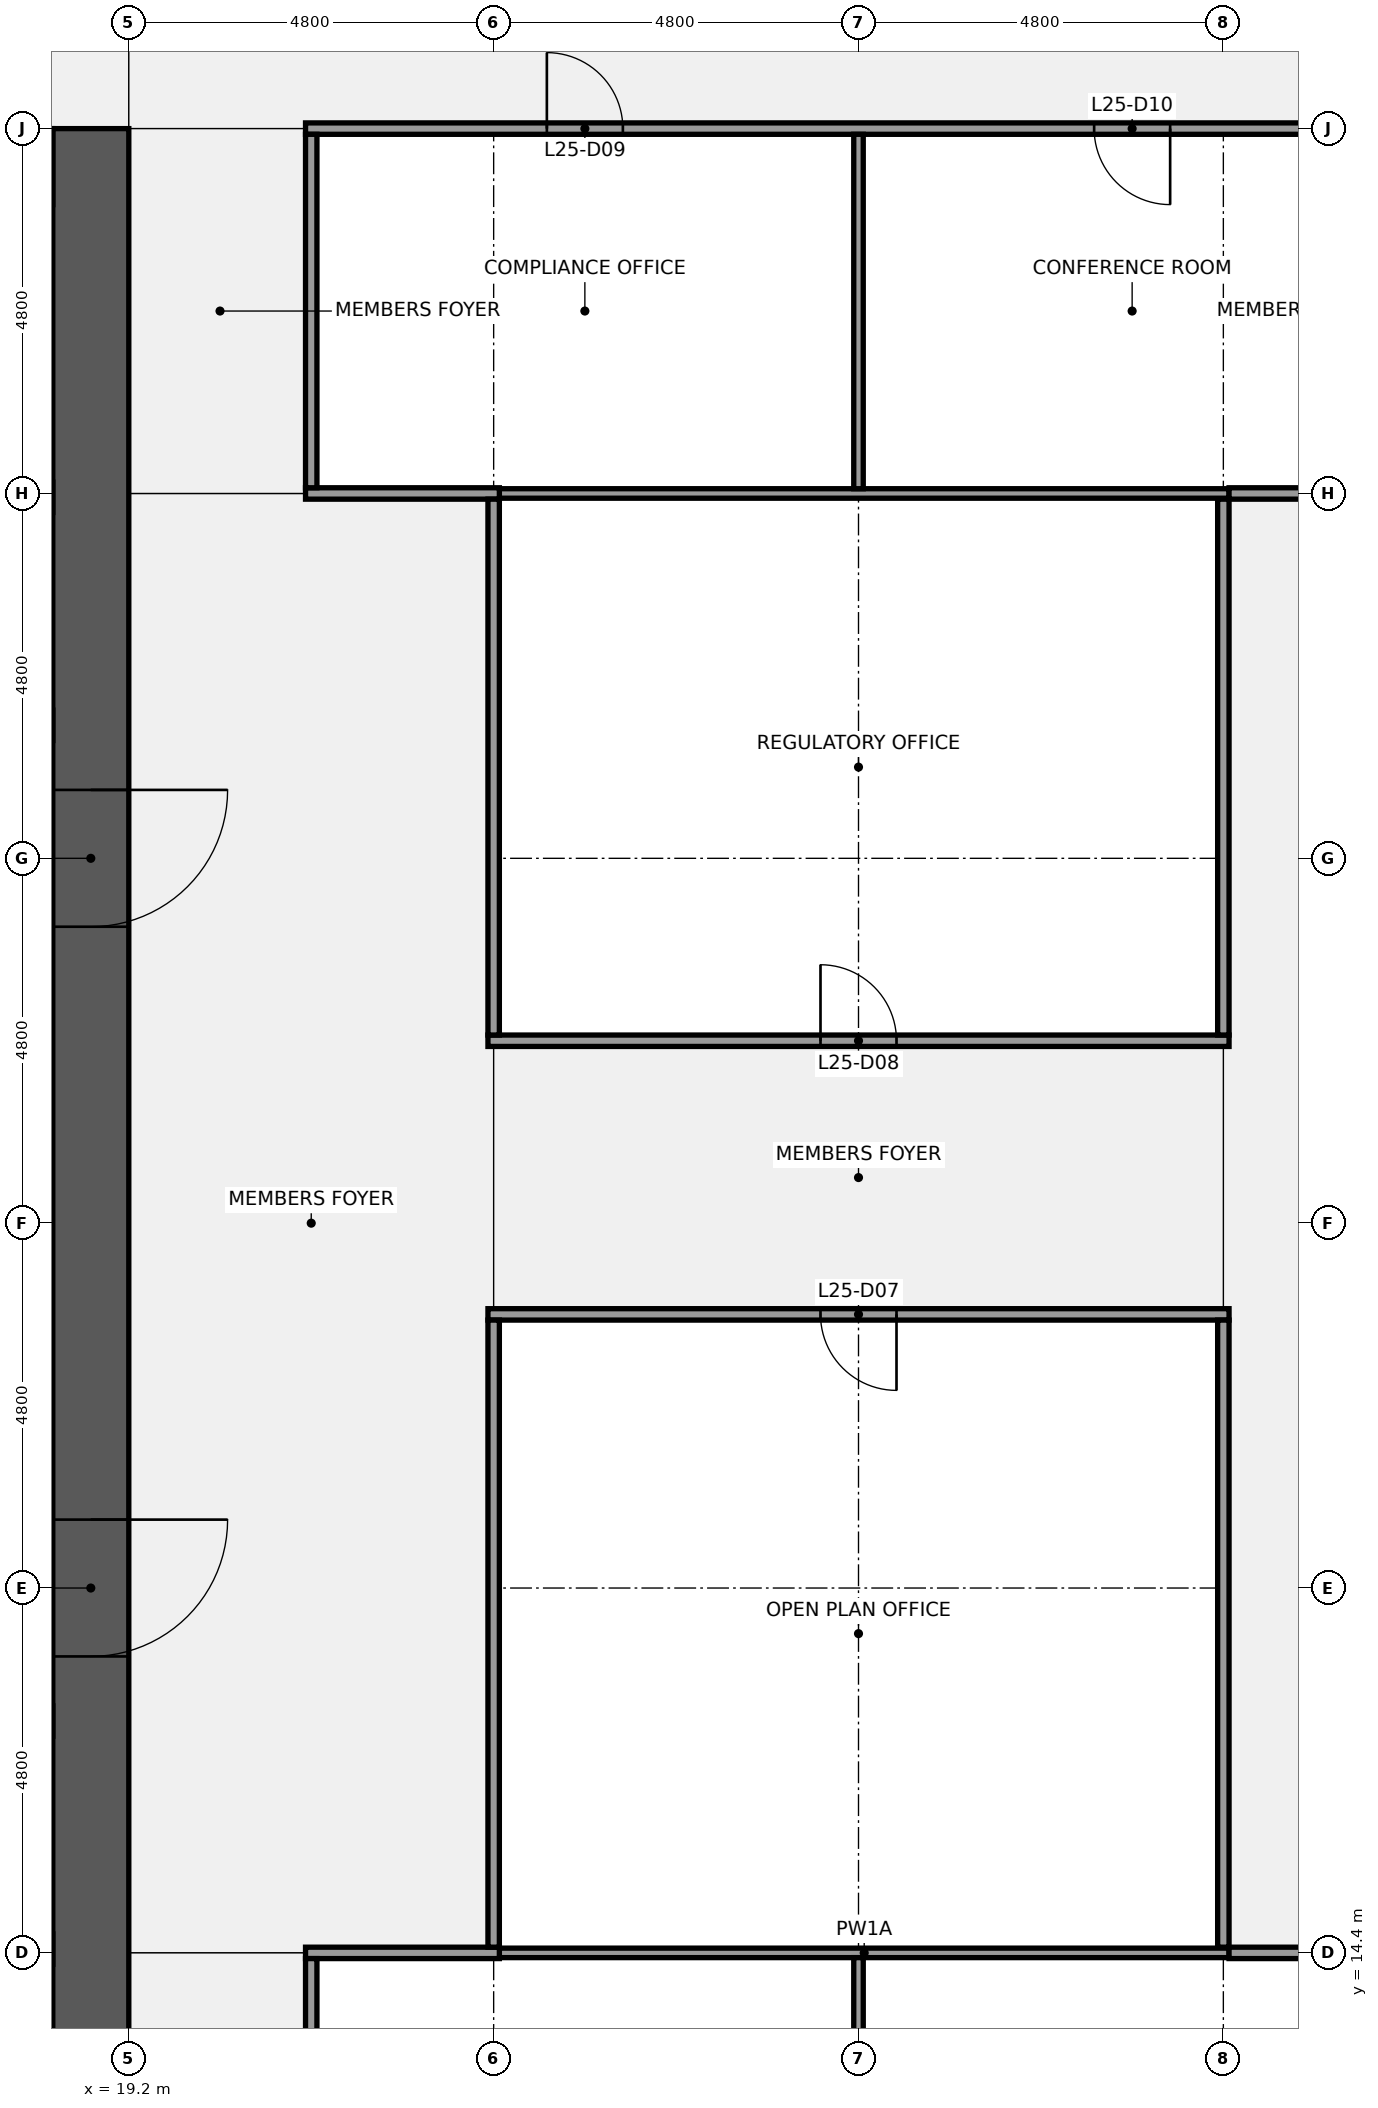
"""IFC4 building model, lengths in metres.
Left out: names, types, materials, properties, quantities, classifications, styles, units other than length and angle.
Written with IfcOpenShell. Run it as: python <this file> out.ifc"""

import sys

from ifc_helpers import new_model, si_unit, direction, frame, frame_2d, origin, place, context, subcontext, project, spatial, rectangle, extrude, element, fill, save


model = new_model("IFC4")
c1 = context("Model", 3, precision=1e-05, world=origin(), true_north=direction((0.0, 1.0)))
c2 = subcontext(c1, "Body", "Model", "MODEL_VIEW")
j1 = project(units=[si_unit("LENGTHUNIT", "METRE"), si_unit("PLANEANGLEUNIT", "RADIAN")], contexts=[c1])
p1 = place(None, origin())
s1 = spatial("IfcSite", under=j1, at=p1, CompositionType="ELEMENT")
p2 = place(p1, origin())
s2 = spatial("IfcBuilding", under=s1, at=p2, CompositionType="ELEMENT")
p3 = place(p2, frame((0.0, 0.0, 120.1)))
s3 = spatial("IfcBuildingStorey", under=s2, at=p3, CompositionType="ELEMENT", Elevation=120.1)
p4 = place(p3, frame((18.7, 38.4, 0.0), z_axis=(0.0, 0.0, 1.0), x_axis=(0.0, -1.0, 0.0)))
e1 = element("IfcWall", 1, at=p4, inside=s3, PredefinedType="SHEAR", context=c2, shape_type="SweptSolid", body=[
    extrude(rectangle(XDim=28.8, YDim=1.0, at=frame_2d((14.4, 0.0))), origin(), (0.0, 0.0, 1.0), 3.84),
])
p5 = place(p4, frame((18.3, 0.0, 0.0)))
e2 = element("IfcOpeningElement", 2, at=p5, cuts=e1, PredefinedType="OPENING", context=c2, shape_type="SweptSolid", body=[
    extrude(rectangle(XDim=1.8, YDim=2.1, at=frame_2d((0.9, 1.05))), frame((0.0, 0.51, 0.0), z_axis=(0.0, -1.0, 0.0), x_axis=(1.0, 0.0, 0.0)), (0.0, 0.0, 1.0), 1.02),
])
p6 = place(p4, frame((8.7, 0.0, 0.0)))
e3 = element("IfcOpeningElement", 3, at=p6, cuts=e1, PredefinedType="OPENING", context=c2, shape_type="SweptSolid", body=[
    extrude(rectangle(XDim=1.8, YDim=2.1, at=frame_2d((0.9, 1.05))), frame((0.0, 0.51, 0.0), z_axis=(0.0, -1.0, 0.0), x_axis=(1.0, 0.0, 0.0)), (0.0, 0.0, 1.0), 1.02),
])
p7 = place(p3, frame((1.0, 14.45, 0.0), z_axis=(0.0, 0.0, 1.0), x_axis=(1.0, 0.0, 0.0)))
e4 = element("IfcWall", 4, at=p7, inside=s3, PredefinedType="SHEAR", context=c2, shape_type="SweptSolid", body=[
    extrude(rectangle(XDim=17.2, YDim=0.4, at=frame_2d((8.6, 0.0))), origin(), (0.0, 0.0, 1.0), 3.84),
])
p8 = place(p3, frame((1.0, 17.45, 0.0), z_axis=(0.0, 0.0, 1.0), x_axis=(1.0, 0.0, 0.0)))
e5 = element("IfcWall", 5, at=p8, inside=s3, PredefinedType="SHEAR", context=c2, shape_type="SweptSolid", body=[
    extrude(rectangle(XDim=17.2, YDim=0.4, at=frame_2d((8.6, 0.0))), origin(), (0.0, 0.0, 1.0), 3.84),
])
p9 = place(p8, frame((0.762, 0.0, 0.0)))
e6 = element("IfcOpeningElement", 6, at=p9, cuts=e5, PredefinedType="OPENING", context=c2, shape_type="SweptSolid", body=[
    extrude(rectangle(XDim=1.0, YDim=2.1, at=frame_2d((0.5, 1.05))), frame((0.0, 0.21, 0.0), z_axis=(0.0, -1.0, 0.0), x_axis=(1.0, 0.0, 0.0)), (0.0, 0.0, 1.0), 0.42),
])
p10 = place(p8, frame((4.5, 0.0, 0.0)))
e7 = element("IfcOpeningElement", 7, at=p10, cuts=e5, PredefinedType="OPENING", context=c2, shape_type="SweptSolid", body=[
    extrude(rectangle(XDim=1.0, YDim=2.1, at=frame_2d((0.5, 1.05))), frame((0.0, 0.21, 0.0), z_axis=(0.0, -1.0, 0.0), x_axis=(1.0, 0.0, 0.0)), (0.0, 0.0, 1.0), 0.42),
])
p11 = place(p8, frame((8.4, 0.0, 0.0)))
e8 = element("IfcOpeningElement", 8, at=p11, cuts=e5, PredefinedType="OPENING", context=c2, shape_type="SweptSolid", body=[
    extrude(rectangle(XDim=1.0, YDim=2.1, at=frame_2d((0.5, 1.05))), frame((0.0, 0.21, 0.0), z_axis=(0.0, -1.0, 0.0), x_axis=(1.0, 0.0, 0.0)), (0.0, 0.0, 1.0), 0.42),
])
p12 = place(p8, frame((11.4, 0.0, 0.0)))
e9 = element("IfcOpeningElement", 9, at=p12, cuts=e5, PredefinedType="OPENING", context=c2, shape_type="SweptSolid", body=[
    extrude(rectangle(XDim=1.0, YDim=2.1, at=frame_2d((0.5, 1.05))), frame((0.0, 0.21, 0.0), z_axis=(0.0, -1.0, 0.0), x_axis=(1.0, 0.0, 0.0)), (0.0, 0.0, 1.0), 0.42),
])
p13 = place(p8, frame((14.837, 0.0, 0.0)))
e10 = element("IfcOpeningElement", 10, at=p13, cuts=e5, PredefinedType="OPENING", context=c2, shape_type="SweptSolid", body=[
    extrude(rectangle(XDim=1.0, YDim=2.1, at=frame_2d((0.5, 1.05))), frame((0.0, 0.21, 0.0), z_axis=(0.0, -1.0, 0.0), x_axis=(1.0, 0.0, 0.0)), (0.0, 0.0, 1.0), 0.42),
])
p14 = place(p3, frame((1.0, 30.55, 0.0), z_axis=(0.0, 0.0, 1.0), x_axis=(1.0, 0.0, 0.0)))
e11 = element("IfcWall", 11, at=p14, inside=s3, PredefinedType="SHEAR", context=c2, shape_type="SweptSolid", body=[
    extrude(rectangle(XDim=17.2, YDim=0.4, at=frame_2d((8.6, 0.0))), origin(), (0.0, 0.0, 1.0), 3.84),
])
p15 = place(p14, frame((1.663, 0.0, 0.0)))
e12 = element("IfcOpeningElement", 12, at=p15, cuts=e11, PredefinedType="OPENING", context=c2, shape_type="SweptSolid", body=[
    extrude(rectangle(XDim=1.0, YDim=2.1, at=frame_2d((0.5, 1.05))), frame((0.0, 0.21, 0.0), z_axis=(0.0, -1.0, 0.0), x_axis=(1.0, 0.0, 0.0)), (0.0, 0.0, 1.0), 0.42),
])
p16 = place(p14, frame((5.7, 0.0, 0.0)))
e13 = element("IfcOpeningElement", 13, at=p16, cuts=e11, PredefinedType="OPENING", context=c2, shape_type="SweptSolid", body=[
    extrude(rectangle(XDim=1.0, YDim=2.1, at=frame_2d((0.5, 1.05))), frame((0.0, 0.21, 0.0), z_axis=(0.0, -1.0, 0.0), x_axis=(1.0, 0.0, 0.0)), (0.0, 0.0, 1.0), 0.42),
])
p17 = place(p14, frame((9.0, 0.0, 0.0)))
e14 = element("IfcOpeningElement", 14, at=p17, cuts=e11, PredefinedType="OPENING", context=c2, shape_type="SweptSolid", body=[
    extrude(rectangle(XDim=1.0, YDim=2.1, at=frame_2d((0.5, 1.05))), frame((0.0, 0.21, 0.0), z_axis=(0.0, -1.0, 0.0), x_axis=(1.0, 0.0, 0.0)), (0.0, 0.0, 1.0), 0.42),
])
p18 = place(p14, frame((11.7, 0.0, 0.0)))
e15 = element("IfcOpeningElement", 15, at=p18, cuts=e11, PredefinedType="OPENING", context=c2, shape_type="SweptSolid", body=[
    extrude(rectangle(XDim=1.0, YDim=2.1, at=frame_2d((0.5, 1.05))), frame((0.0, 0.21, 0.0), z_axis=(0.0, -1.0, 0.0), x_axis=(1.0, 0.0, 0.0)), (0.0, 0.0, 1.0), 0.42),
])
p19 = place(p14, frame((14.837, 0.0, 0.0)))
e16 = element("IfcOpeningElement", 16, at=p19, cuts=e11, PredefinedType="OPENING", context=c2, shape_type="SweptSolid", body=[
    extrude(rectangle(XDim=1.0, YDim=2.1, at=frame_2d((0.5, 1.05))), frame((0.0, 0.21, 0.0), z_axis=(0.0, -1.0, 0.0), x_axis=(1.0, 0.0, 0.0)), (0.0, 0.0, 1.0), 0.42),
])
p20 = place(p3, frame((1.0, 33.55, 0.0), z_axis=(0.0, 0.0, 1.0), x_axis=(1.0, 0.0, 0.0)))
e17 = element("IfcWall", 17, at=p20, inside=s3, PredefinedType="SHEAR", context=c2, shape_type="SweptSolid", body=[
    extrude(rectangle(XDim=17.2, YDim=0.4, at=frame_2d((8.6, 0.0))), origin(), (0.0, 0.0, 1.0), 3.84),
])
p21 = place(p3, frame((24.075, 14.4, 0.0), z_axis=(0.0, 0.0, 1.0), x_axis=(1.0, 0.0, 0.0)))
e18 = element("IfcWall", 18, at=p21, inside=s3, PredefinedType="PARTITIONING", context=c2, shape_type="SweptSolid", body=[
    extrude(rectangle(XDim=9.6, YDim=0.125, at=frame_2d((4.8, 0.0))), origin(), (0.0, 0.0, 1.0), 2.936),
])
p22 = place(p3, frame((21.525, 14.4, 0.0), z_axis=(0.0, 0.0, 1.0), x_axis=(1.0, 0.0, 0.0)))
e19 = element("IfcWall", 19, at=p22, inside=s3, PredefinedType="PARTITIONING", context=c2, shape_type="SweptSolid", body=[
    extrude(rectangle(XDim=2.55, YDim=0.15, at=frame_2d((1.275, 0.0))), origin(), (0.0, 0.0, 1.0), 2.936),
])
p23 = place(p3, frame((33.675, 14.4, 0.0), z_axis=(0.0, 0.0, 1.0), x_axis=(1.0, 0.0, 0.0)))
e20 = element("IfcWall", 20, at=p23, inside=s3, PredefinedType="PARTITIONING", context=c2, shape_type="SweptSolid", body=[
    extrude(rectangle(XDim=2.4, YDim=0.15, at=frame_2d((1.2, 0.0))), origin(), (0.0, 0.0, 1.0), 2.936),
])
p24 = place(p3, frame((23.925, 22.8, 0.0), z_axis=(0.0, 0.0, 1.0), x_axis=(1.0, 0.0, 0.0)))
e21 = element("IfcWall", 21, at=p24, inside=s3, PredefinedType="PARTITIONING", context=c2, shape_type="SweptSolid", body=[
    extrude(rectangle(XDim=9.75, YDim=0.15, at=frame_2d((4.875, 0.0))), origin(), (0.0, 0.0, 1.0), 2.936),
])
p25 = place(p24, frame((4.375, 0.0, 0.0)))
e22 = element("IfcOpeningElement", 22, at=p25, cuts=e21, PredefinedType="OPENING", context=c2, shape_type="SweptSolid", body=[
    extrude(rectangle(XDim=1.0, YDim=2.1, at=frame_2d((0.5, 1.05))), frame((0.0, 0.085, 0.0), z_axis=(0.0, -1.0, 0.0), x_axis=(1.0, 0.0, 0.0)), (0.0, 0.0, 1.0), 0.17),
])
p26 = place(p3, frame((23.925, 26.4, 0.0), z_axis=(0.0, 0.0, 1.0), x_axis=(1.0, 0.0, 0.0)))
e23 = element("IfcWall", 23, at=p26, inside=s3, PredefinedType="PARTITIONING", context=c2, shape_type="SweptSolid", body=[
    extrude(rectangle(XDim=9.75, YDim=0.15, at=frame_2d((4.875, 0.0))), origin(), (0.0, 0.0, 1.0), 2.936),
])
p27 = place(p26, frame((4.375, 0.0, 0.0)))
e24 = element("IfcOpeningElement", 24, at=p27, cuts=e23, PredefinedType="OPENING", context=c2, shape_type="SweptSolid", body=[
    extrude(rectangle(XDim=1.0, YDim=2.1, at=frame_2d((0.5, 1.05))), frame((0.0, 0.085, 0.0), z_axis=(0.0, -1.0, 0.0), x_axis=(1.0, 0.0, 0.0)), (0.0, 0.0, 1.0), 0.17),
])
p28 = place(p3, frame((24.075, 33.6, 0.0), z_axis=(0.0, 0.0, 1.0), x_axis=(1.0, 0.0, 0.0)))
e25 = element("IfcWall", 25, at=p28, inside=s3, PredefinedType="PARTITIONING", context=c2, shape_type="SweptSolid", body=[
    extrude(rectangle(XDim=9.6, YDim=0.125, at=frame_2d((4.8, 0.0))), origin(), (0.0, 0.0, 1.0), 2.936),
])
p29 = place(p3, frame((21.525, 33.6, 0.0), z_axis=(0.0, 0.0, 1.0), x_axis=(1.0, 0.0, 0.0)))
e26 = element("IfcWall", 26, at=p29, inside=s3, PredefinedType="PARTITIONING", context=c2, shape_type="SweptSolid", body=[
    extrude(rectangle(XDim=2.55, YDim=0.15, at=frame_2d((1.275, 0.0))), origin(), (0.0, 0.0, 1.0), 2.936),
])
p30 = place(p3, frame((33.675, 33.6, 0.0), z_axis=(0.0, 0.0, 1.0), x_axis=(1.0, 0.0, 0.0)))
e27 = element("IfcWall", 27, at=p30, inside=s3, PredefinedType="PARTITIONING", context=c2, shape_type="SweptSolid", body=[
    extrude(rectangle(XDim=2.4, YDim=0.15, at=frame_2d((1.2, 0.0))), origin(), (0.0, 0.0, 1.0), 2.936),
])
p31 = place(p3, frame((21.525, 38.4, 0.0), z_axis=(0.0, 0.0, 1.0), x_axis=(1.0, 0.0, 0.0)))
e28 = element("IfcWall", 28, at=p31, inside=s3, PredefinedType="PARTITIONING", context=c2, shape_type="SweptSolid", body=[
    extrude(rectangle(XDim=14.55, YDim=0.15, at=frame_2d((7.275, 0.0))), origin(), (0.0, 0.0, 1.0), 2.936),
])
p32 = place(p31, frame((3.175, 0.0, 0.0)))
e29 = element("IfcOpeningElement", 29, at=p32, cuts=e28, PredefinedType="OPENING", context=c2, shape_type="SweptSolid", body=[
    extrude(rectangle(XDim=1.0, YDim=2.1, at=frame_2d((0.5, 1.05))), frame((0.0, 0.085, 0.0), z_axis=(0.0, -1.0, 0.0), x_axis=(1.0, 0.0, 0.0)), (0.0, 0.0, 1.0), 0.17),
])
p33 = place(p31, frame((10.375, 0.0, 0.0)))
e30 = element("IfcOpeningElement", 30, at=p33, cuts=e28, PredefinedType="OPENING", context=c2, shape_type="SweptSolid", body=[
    extrude(rectangle(XDim=1.0, YDim=2.1, at=frame_2d((0.5, 1.05))), frame((0.0, 0.085, 0.0), z_axis=(0.0, -1.0, 0.0), x_axis=(1.0, 0.0, 0.0)), (0.0, 0.0, 1.0), 0.17),
])
for number, where, z_axis, x_axis in (
    (31, (21.6, 9.675, 0.0), (0.0, 0.0, 1.0), (0.0, 1.0, 0.0)),
    (32, (21.6, 33.675, 0.0), (0.0, 0.0, 1.0), (0.0, 1.0, 0.0)),
):
    element("IfcWall", number, at=place(p3, frame(where, z_axis=z_axis, x_axis=x_axis)), inside=s3, PredefinedType="PARTITIONING", context=c2, shape_type="SweptSolid", body=[
        extrude(rectangle(XDim=4.65, YDim=0.15, at=frame_2d((2.325, 0.0))), origin(), (0.0, 0.0, 1.0), 2.936),
    ])
p34 = place(p3, frame((24.0, 14.475, 0.0), z_axis=(0.0, 0.0, 1.0), x_axis=(0.0, 1.0, 0.0)))
e33 = element("IfcWall", 33, at=p34, inside=s3, PredefinedType="PARTITIONING", context=c2, shape_type="SweptSolid", body=[
    extrude(rectangle(XDim=8.25, YDim=0.15, at=frame_2d((4.125, 0.0))), origin(), (0.0, 0.0, 1.0), 2.936),
])
p35 = place(p3, frame((24.0, 26.475, 0.0), z_axis=(0.0, 0.0, 1.0), x_axis=(0.0, 1.0, 0.0)))
e34 = element("IfcWall", 34, at=p35, inside=s3, PredefinedType="PARTITIONING", context=c2, shape_type="SweptSolid", body=[
    extrude(rectangle(XDim=7.05, YDim=0.15, at=frame_2d((3.525, 0.0))), origin(), (0.0, 0.0, 1.0), 2.936),
])
for number, where, z_axis, x_axis in (
    (35, (28.8, 9.675, 0.0), (0.0, 0.0, 1.0), (0.0, 1.0, 0.0)),
    (36, (28.8, 33.663, 0.0), (0.0, 0.0, 1.0), (0.0, 1.0, 0.0)),
):
    element("IfcWall", number, at=place(p3, frame(where, z_axis=z_axis, x_axis=x_axis)), inside=s3, PredefinedType="PARTITIONING", context=c2, shape_type="SweptSolid", body=[
        extrude(rectangle(XDim=4.662, YDim=0.125, at=frame_2d((2.331, 0.0))), origin(), (0.0, 0.0, 1.0), 2.936),
    ])
p36 = place(p3, frame((33.6, 14.475, 0.0), z_axis=(0.0, 0.0, 1.0), x_axis=(0.0, 1.0, 0.0)))
e37 = element("IfcWall", 37, at=p36, inside=s3, PredefinedType="PARTITIONING", context=c2, shape_type="SweptSolid", body=[
    extrude(rectangle(XDim=8.25, YDim=0.15, at=frame_2d((4.125, 0.0))), origin(), (0.0, 0.0, 1.0), 2.936),
])
p37 = place(p3, frame((33.6, 26.475, 0.0), z_axis=(0.0, 0.0, 1.0), x_axis=(0.0, 1.0, 0.0)))
e38 = element("IfcWall", 38, at=p37, inside=s3, PredefinedType="PARTITIONING", context=c2, shape_type="SweptSolid", body=[
    extrude(rectangle(XDim=7.05, YDim=0.15, at=frame_2d((3.525, 0.0))), origin(), (0.0, 0.0, 1.0), 2.936),
])
p38 = place(p5, origin())
e39 = element("IfcDoor", 39, at=p38, inside=s3, OperationType="DOUBLE_DOOR_SINGLE_SWING", PredefinedType="DOOR", context=c2, shape_type="SweptSolid", body=[
    extrude(rectangle(XDim=1.8, YDim=2.1, at=frame_2d((0.9, 1.05))), frame((0.0, 0.025, 0.0), z_axis=(0.0, -1.0, 0.0), x_axis=(1.0, 0.0, 0.0)), (0.0, 0.0, 1.0), 0.05),
])
fill(e2, e39)
p39 = place(p6, origin())
e40 = element("IfcDoor", 40, at=p39, inside=s3, OperationType="DOUBLE_DOOR_SINGLE_SWING", PredefinedType="DOOR", context=c2, shape_type="SweptSolid", body=[
    extrude(rectangle(XDim=1.8, YDim=2.1, at=frame_2d((0.9, 1.05))), frame((0.0, 0.025, 0.0), z_axis=(0.0, -1.0, 0.0), x_axis=(1.0, 0.0, 0.0)), (0.0, 0.0, 1.0), 0.05),
])
fill(e3, e40)
p40 = place(p25, origin())
e41 = element("IfcDoor", 41, at=p40, inside=s3, OperationType="SINGLE_SWING_RIGHT", PredefinedType="DOOR", context=c2, shape_type="SweptSolid", body=[
    extrude(rectangle(XDim=1.0, YDim=2.1, at=frame_2d((0.5, 1.05))), frame((0.0, 0.025, 0.0), z_axis=(0.0, -1.0, 0.0), x_axis=(1.0, 0.0, 0.0)), (0.0, 0.0, 1.0), 0.05),
])
fill(e22, e41)
p41 = place(p27, origin())
e42 = element("IfcDoor", 42, at=p41, inside=s3, OperationType="SINGLE_SWING_LEFT", PredefinedType="DOOR", context=c2, shape_type="SweptSolid", body=[
    extrude(rectangle(XDim=1.0, YDim=2.1, at=frame_2d((0.5, 1.05))), frame((0.0, 0.025, 0.0), z_axis=(0.0, -1.0, 0.0), x_axis=(1.0, 0.0, 0.0)), (0.0, 0.0, 1.0), 0.05),
])
fill(e24, e42)
p42 = place(p32, origin())
e43 = element("IfcDoor", 43, at=p42, inside=s3, OperationType="SINGLE_SWING_LEFT", PredefinedType="DOOR", context=c2, shape_type="SweptSolid", body=[
    extrude(rectangle(XDim=1.0, YDim=2.1, at=frame_2d((0.5, 1.05))), frame((0.0, 0.025, 0.0), z_axis=(0.0, -1.0, 0.0), x_axis=(1.0, 0.0, 0.0)), (0.0, 0.0, 1.0), 0.05),
])
fill(e29, e43)
p43 = place(p33, origin())
e44 = element("IfcDoor", 44, at=p43, inside=s3, OperationType="SINGLE_SWING_RIGHT", PredefinedType="DOOR", context=c2, shape_type="SweptSolid", body=[
    extrude(rectangle(XDim=1.0, YDim=2.1, at=frame_2d((0.5, 1.05))), frame((0.0, 0.025, 0.0), z_axis=(0.0, -1.0, 0.0), x_axis=(1.0, 0.0, 0.0)), (0.0, 0.0, 1.0), 0.05),
])
fill(e30, e44)
save(model, sys.argv[1])
